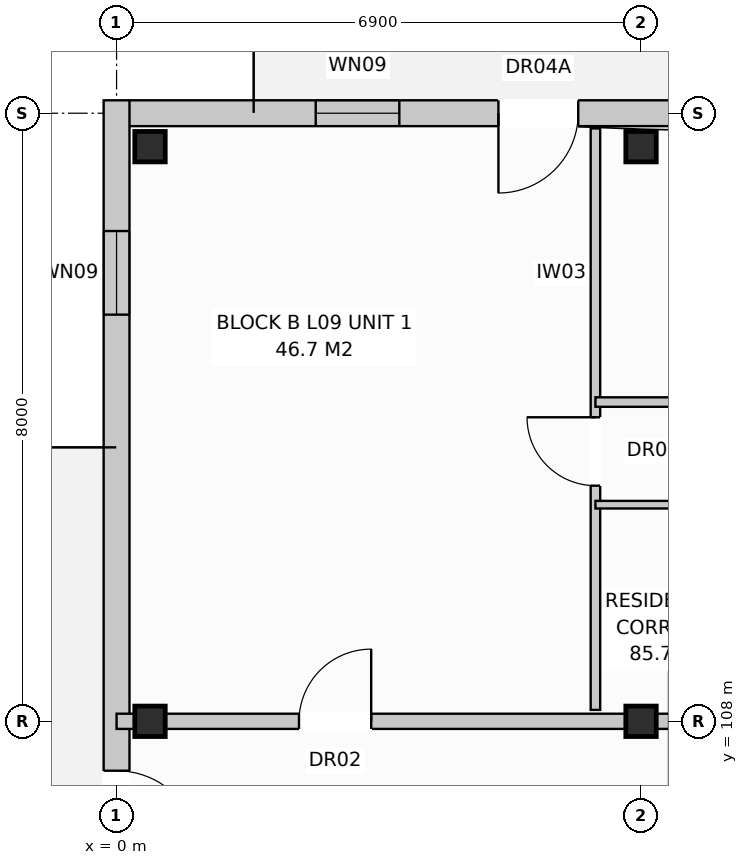
"""IFC4 building model, lengths in metres.
Left out: names, types, materials, properties, quantities, classifications, styles, units other than length and angle.
Written with IfcOpenShell. Run it as: python <this file> out.ifc"""

import sys

from ifc_helpers import new_model, si_unit, direction, frame, frame_2d, origin, origin_with_axes, origin_2d, place, context, subcontext, project, spatial, rectangle, extrude, element, fill, save


model = new_model("IFC4")
c1 = context("Model", 3, precision=1e-05, world=origin(), true_north=direction((0.0, 1.0)))
c2 = subcontext(c1, "Body", "Model", "MODEL_VIEW")
j1 = project(units=[si_unit("LENGTHUNIT", "METRE"), si_unit("PLANEANGLEUNIT", "RADIAN")], contexts=[c1])
p1 = place(None, origin())
s1 = spatial("IfcSite", under=j1, at=p1, CompositionType="ELEMENT")
p2 = place(p1, origin())
s2 = spatial("IfcBuilding", under=s1, at=p2, CompositionType="ELEMENT")
p3 = place(p2, frame((0.0, 0.0, 30.4)))
s3 = spatial("IfcBuildingStorey", under=s2, at=p3, CompositionType="ELEMENT", Elevation=30.4)
for number, where, z_axis, x_axis in (
    (1, (0.44, 108.0, 0.0), (0.0, 0.0, 1.0), (1.0, 0.0, 0.0)),
    (2, (0.44, 115.56, 0.0), (0.0, 0.0, 1.0), (1.0, 0.0, 0.0)),
    (3, (6.9, 108.0, 0.0), (0.0, 0.0, 1.0), (1.0, 0.0, 0.0)),
    (4, (6.9, 115.56, 0.0), (0.0, 0.0, 1.0), (1.0, 0.0, 0.0)),
):
    element("IfcColumn", number, at=place(p3, frame(where, z_axis=z_axis, x_axis=x_axis)), inside=s3, PredefinedType="COLUMN", context=c2, shape_type="SweptSolid", body=[
        extrude(rectangle(XDim=0.4, YDim=0.4, at=origin_2d()), origin(), (0.0, 0.0, 1.0), 3.2),
    ])
p4 = place(p3, frame((0.16, 116.0, 0.0), z_axis=(0.0, 0.0, 1.0), x_axis=(1.0, 0.0, 0.0)))
e5 = element("IfcWall", 5, at=p4, inside=s3, PredefinedType="STANDARD", context=c2, shape_type="SweptSolid", body=[
    extrude(rectangle(XDim=41.08, YDim=0.34, at=frame_2d((20.54, 0.0))), origin(), (0.0, 0.0, 1.0), 2.96),
])
p5 = place(p4, frame((4.864, 0.0, 0.0)))
e6 = element("IfcOpeningElement", 6, at=p5, cuts=e5, PredefinedType="OPENING", context=c2, shape_type="SweptSolid", body=[
    extrude(rectangle(XDim=1.05, YDim=2.12, at=frame_2d((0.525, 1.06))), frame((0.0, 0.182, 0.0), z_axis=(0.0, -1.0, 0.0), x_axis=(1.0, 0.0, 0.0)), (0.0, 0.0, 1.0), 0.364),
])
p6 = place(p4, frame((18.86, 0.0, 0.0)))
e7 = element("IfcOpeningElement", 7, at=p6, cuts=e5, PredefinedType="OPENING", context=c2, shape_type="SweptSolid", body=[
    extrude(rectangle(XDim=1.05, YDim=2.12, at=frame_2d((0.525, 1.06))), frame((0.0, 0.182, 0.0), z_axis=(0.0, -1.0, 0.0), x_axis=(1.0, 0.0, 0.0)), (0.0, 0.0, 1.0), 0.364),
])
p7 = place(p4, frame((30.364, 0.0, 0.0)))
e8 = element("IfcOpeningElement", 8, at=p7, cuts=e5, PredefinedType="OPENING", context=c2, shape_type="SweptSolid", body=[
    extrude(rectangle(XDim=1.05, YDim=2.12, at=frame_2d((0.525, 1.06))), frame((0.0, 0.182, 0.0), z_axis=(0.0, -1.0, 0.0), x_axis=(1.0, 0.0, 0.0)), (0.0, 0.0, 1.0), 0.364),
])
p8 = place(p4, frame((2.46, 0.0, 0.72)))
e9 = element("IfcOpeningElement", 9, at=p8, cuts=e5, PredefinedType="OPENING", context=c2, shape_type="SweptSolid", body=[
    extrude(rectangle(XDim=1.1, YDim=1.5, at=frame_2d((0.55, 0.75))), frame((0.0, 0.182, 0.0), z_axis=(0.0, -1.0, 0.0), x_axis=(1.0, 0.0, 0.0)), (0.0, 0.0, 1.0), 0.364),
])
p9 = place(p4, frame((7.735, 0.0, 0.8)))
e10 = element("IfcOpeningElement", 10, at=p9, cuts=e5, PredefinedType="OPENING", context=c2, shape_type="SweptSolid", body=[
    extrude(rectangle(XDim=1.95, YDim=1.65, at=frame_2d((0.975, 0.825))), frame((0.0, 0.182, 0.0), z_axis=(0.0, -1.0, 0.0), x_axis=(1.0, 0.0, 0.0)), (0.0, 0.0, 1.0), 0.364),
])
p10 = place(p4, frame((14.56, 0.0, 0.72)))
e11 = element("IfcOpeningElement", 11, at=p10, cuts=e5, PredefinedType="OPENING", context=c2, shape_type="SweptSolid", body=[
    extrude(rectangle(XDim=1.1, YDim=1.5, at=frame_2d((0.55, 0.75))), frame((0.0, 0.182, 0.0), z_axis=(0.0, -1.0, 0.0), x_axis=(1.0, 0.0, 0.0)), (0.0, 0.0, 1.0), 0.364),
])
p11 = place(p4, frame((16.81, 0.0, 0.8)))
e12 = element("IfcOpeningElement", 12, at=p11, cuts=e5, PredefinedType="OPENING", context=c2, shape_type="SweptSolid", body=[
    extrude(rectangle(XDim=1.8, YDim=1.7, at=frame_2d((0.9, 0.85))), frame((0.0, 0.182, 0.0), z_axis=(0.0, -1.0, 0.0), x_axis=(1.0, 0.0, 0.0)), (0.0, 0.0, 1.0), 0.364),
])
p12 = place(p4, frame((21.535, 0.0, 0.8)))
e13 = element("IfcOpeningElement", 13, at=p12, cuts=e5, PredefinedType="OPENING", context=c2, shape_type="SweptSolid", body=[
    extrude(rectangle(XDim=1.95, YDim=1.65, at=frame_2d((0.975, 0.825))), frame((0.0, 0.182, 0.0), z_axis=(0.0, -1.0, 0.0), x_axis=(1.0, 0.0, 0.0)), (0.0, 0.0, 1.0), 0.364),
])
p13 = place(p4, frame((25.36, 0.0, 0.72)))
e14 = element("IfcOpeningElement", 14, at=p13, cuts=e5, PredefinedType="OPENING", context=c2, shape_type="SweptSolid", body=[
    extrude(rectangle(XDim=1.1, YDim=1.5, at=frame_2d((0.55, 0.75))), frame((0.0, 0.182, 0.0), z_axis=(0.0, -1.0, 0.0), x_axis=(1.0, 0.0, 0.0)), (0.0, 0.0, 1.0), 0.364),
])
p14 = place(p4, frame((28.66, 0.0, 0.72)))
e15 = element("IfcOpeningElement", 15, at=p14, cuts=e5, PredefinedType="OPENING", context=c2, shape_type="SweptSolid", body=[
    extrude(rectangle(XDim=1.1, YDim=1.5, at=frame_2d((0.55, 0.75))), frame((0.0, 0.182, 0.0), z_axis=(0.0, -1.0, 0.0), x_axis=(1.0, 0.0, 0.0)), (0.0, 0.0, 1.0), 0.364),
])
p15 = place(p4, frame((31.935, 0.0, 0.8)))
e16 = element("IfcOpeningElement", 16, at=p15, cuts=e5, PredefinedType="OPENING", context=c2, shape_type="SweptSolid", body=[
    extrude(rectangle(XDim=1.95, YDim=1.65, at=frame_2d((0.975, 0.825))), frame((0.0, 0.182, 0.0), z_axis=(0.0, -1.0, 0.0), x_axis=(1.0, 0.0, 0.0)), (0.0, 0.0, 1.0), 0.364),
])
p16 = place(p4, frame((38.06, 0.0, 0.72)))
e17 = element("IfcOpeningElement", 17, at=p16, cuts=e5, PredefinedType="OPENING", context=c2, shape_type="SweptSolid", body=[
    extrude(rectangle(XDim=1.1, YDim=1.5, at=frame_2d((0.55, 0.75))), frame((0.0, 0.182, 0.0), z_axis=(0.0, -1.0, 0.0), x_axis=(1.0, 0.0, 0.0)), (0.0, 0.0, 1.0), 0.364),
])
p17 = place(p3, frame((0.0, 97.43, 0.0), z_axis=(0.0, 0.0, 1.0), x_axis=(0.0, 1.0, 0.0)))
e18 = element("IfcWall", 18, at=p17, inside=s3, PredefinedType="STANDARD", context=c2, shape_type="SweptSolid", body=[
    extrude(rectangle(XDim=18.74, YDim=0.34, at=frame_2d((9.37, 0.0))), origin(), (0.0, 0.0, 1.0), 2.96),
])
p18 = place(p17, frame((8.82, 0.0, 0.0)))
e19 = element("IfcOpeningElement", 19, at=p18, cuts=e18, PredefinedType="OPENING", context=c2, shape_type="SweptSolid", body=[
    extrude(rectangle(XDim=1.1, YDim=2.1, at=frame_2d((0.55, 1.05))), frame((0.0, 0.182, 0.0), z_axis=(0.0, -1.0, 0.0), x_axis=(1.0, 0.0, 0.0)), (0.0, 0.0, 1.0), 0.364),
])
p19 = place(p17, frame((1.72, 0.0, 0.72)))
e20 = element("IfcOpeningElement", 20, at=p19, cuts=e18, PredefinedType="OPENING", context=c2, shape_type="SweptSolid", body=[
    extrude(rectangle(XDim=1.1, YDim=1.5, at=frame_2d((0.55, 0.75))), frame((0.0, 0.182, 0.0), z_axis=(0.0, -1.0, 0.0), x_axis=(1.0, 0.0, 0.0)), (0.0, 0.0, 1.0), 0.364),
])
p20 = place(p17, frame((15.92, 0.0, 0.72)))
e21 = element("IfcOpeningElement", 21, at=p20, cuts=e18, PredefinedType="OPENING", context=c2, shape_type="SweptSolid", body=[
    extrude(rectangle(XDim=1.1, YDim=1.5, at=frame_2d((0.55, 0.75))), frame((0.0, 0.182, 0.0), z_axis=(0.0, -1.0, 0.0), x_axis=(1.0, 0.0, 0.0)), (0.0, 0.0, 1.0), 0.364),
])
p21 = place(p3, frame((0.0, 108.0, 0.0), z_axis=(0.0, 0.0, 1.0), x_axis=(1.0, 0.0, 0.0)))
e22 = element("IfcWall", 22, at=p21, inside=s3, PredefinedType="PARTITIONING", context=c2, shape_type="SweptSolid", body=[
    extrude(rectangle(XDim=20.7, YDim=0.2, at=frame_2d((10.35, 0.0))), origin(), (0.0, 0.0, 1.0), 2.4),
])
p22 = place(p21, frame((2.4, 0.0, 0.0)))
e23 = element("IfcOpeningElement", 23, at=p22, cuts=e22, PredefinedType="OPENING", context=c2, shape_type="SweptSolid", body=[
    extrude(rectangle(XDim=0.95, YDim=2.15, at=frame_2d((0.475, 1.075))), frame((0.0, 0.112, 0.0), z_axis=(0.0, -1.0, 0.0), x_axis=(1.0, 0.0, 0.0)), (0.0, 0.0, 1.0), 0.224),
])
p23 = place(p3, frame((6.3, 108.15, 0.0), z_axis=(0.0, 0.0, 1.0), x_axis=(0.0, 1.0, 0.0)))
e24 = element("IfcWall", 24, at=p23, inside=s3, PredefinedType="PARTITIONING", context=c2, shape_type="SweptSolid", body=[
    extrude(rectangle(XDim=7.65, YDim=0.125, at=frame_2d((3.825, 0.0))), origin(), (0.0, 0.0, 1.0), 2.96),
])
p24 = place(p23, frame((2.95, 0.0, 0.0)))
e25 = element("IfcOpeningElement", 25, at=p24, cuts=e24, PredefinedType="OPENING", context=c2, shape_type="SweptSolid", body=[
    extrude(rectangle(XDim=0.9, YDim=2.1, at=frame_2d((0.45, 1.05))), frame((0.0, 0.074, 0.0), z_axis=(0.0, -1.0, 0.0), x_axis=(1.0, 0.0, 0.0)), (0.0, 0.0, 1.0), 0.149),
])
p25 = place(p3, frame((6.3, 110.85, 0.0), z_axis=(0.0, 0.0, 1.0), x_axis=(1.0, 0.0, 0.0)))
e26 = element("IfcWall", 26, at=p25, inside=s3, PredefinedType="PARTITIONING", context=c2, shape_type="SweptSolid", body=[
    extrude(rectangle(XDim=14.3, YDim=0.1, at=frame_2d((7.15, 0.0))), origin(), (0.0, 0.0, 1.0), 2.96),
])
p26 = place(p25, frame((1.6, 0.0, 0.0)))
e27 = element("IfcOpeningElement", 27, at=p26, cuts=e26, PredefinedType="OPENING", context=c2, shape_type="SweptSolid", body=[
    extrude(rectangle(XDim=0.9, YDim=2.1, at=frame_2d((0.45, 1.05))), frame((0.0, 0.062, 0.0), z_axis=(0.0, -1.0, 0.0), x_axis=(1.0, 0.0, 0.0)), (0.0, 0.0, 1.0), 0.124),
])
p27 = place(p25, frame((5.1, 0.0, 0.0)))
e28 = element("IfcOpeningElement", 28, at=p27, cuts=e26, PredefinedType="OPENING", context=c2, shape_type="SweptSolid", body=[
    extrude(rectangle(XDim=0.85, YDim=2.05, at=frame_2d((0.425, 1.025))), frame((0.0, 0.062, 0.0), z_axis=(0.0, -1.0, 0.0), x_axis=(1.0, 0.0, 0.0)), (0.0, 0.0, 1.0), 0.124),
])
p28 = place(p25, frame((8.2, 0.0, 0.0)))
e29 = element("IfcOpeningElement", 29, at=p28, cuts=e26, PredefinedType="OPENING", context=c2, shape_type="SweptSolid", body=[
    extrude(rectangle(XDim=0.85, YDim=2.05, at=frame_2d((0.425, 1.025))), frame((0.0, 0.062, 0.0), z_axis=(0.0, -1.0, 0.0), x_axis=(1.0, 0.0, 0.0)), (0.0, 0.0, 1.0), 0.124),
])
p29 = place(p25, frame((11.6, 0.0, 0.0)))
e30 = element("IfcOpeningElement", 30, at=p29, cuts=e26, PredefinedType="OPENING", context=c2, shape_type="SweptSolid", body=[
    extrude(rectangle(XDim=0.85, YDim=2.05, at=frame_2d((0.425, 1.025))), frame((0.0, 0.062, 0.0), z_axis=(0.0, -1.0, 0.0), x_axis=(1.0, 0.0, 0.0)), (0.0, 0.0, 1.0), 0.124),
])
p30 = place(p3, frame((6.3, 112.2, 0.0), z_axis=(0.0, 0.0, 1.0), x_axis=(1.0, 0.0, 0.0)))
e31 = element("IfcWall", 31, at=p30, inside=s3, PredefinedType="PARTITIONING", context=c2, shape_type="SweptSolid", body=[
    extrude(rectangle(XDim=10.4, YDim=0.125, at=frame_2d((5.2, 0.0))), origin(), (0.0, 0.0, 1.0), 2.96),
])
p31 = place(p30, frame((2.0, 0.0, 0.0)))
e32 = element("IfcOpeningElement", 32, at=p31, cuts=e31, PredefinedType="OPENING", context=c2, shape_type="SweptSolid", body=[
    extrude(rectangle(XDim=0.9, YDim=2.1, at=frame_2d((0.45, 1.05))), frame((0.0, 0.074, 0.0), z_axis=(0.0, -1.0, 0.0), x_axis=(1.0, 0.0, 0.0)), (0.0, 0.0, 1.0), 0.149),
])
p32 = place(p30, frame((7.2, 0.0, 0.0)))
e33 = element("IfcOpeningElement", 33, at=p32, cuts=e31, PredefinedType="OPENING", context=c2, shape_type="SweptSolid", body=[
    extrude(rectangle(XDim=0.9, YDim=2.1, at=frame_2d((0.45, 1.05))), frame((0.0, 0.074, 0.0), z_axis=(0.0, -1.0, 0.0), x_axis=(1.0, 0.0, 0.0)), (0.0, 0.0, 1.0), 0.149),
])
p33 = place(p5, frame((1.05, 0.0, 0.0), z_axis=(0.0, 0.0, 1.0), x_axis=(-1.0, 0.0, 0.0)))
e34 = element("IfcDoor", 34, at=p33, inside=s3, OperationType="SINGLE_SWING_LEFT", PredefinedType="DOOR", context=c2, shape_type="SweptSolid", body=[
    extrude(rectangle(XDim=1.05, YDim=2.12, at=frame_2d((0.525, 1.06))), frame((0.0, 0.025, 0.0), z_axis=(0.0, -1.0, 0.0), x_axis=(1.0, 0.0, 0.0)), (0.0, 0.0, 1.0), 0.05),
])
fill(e6, e34)
p34 = place(p8, origin_with_axes())
e35 = element("IfcWindow", 35, at=p34, inside=s3, PartitioningType="SINGLE_PANEL", PredefinedType="WINDOW", context=c2, shape_type="SweptSolid", body=[
    extrude(rectangle(XDim=1.1, YDim=1.5, at=frame_2d((0.55, 0.75))), frame((0.0, 0.03, 0.0), z_axis=(0.0, -1.0, 0.0), x_axis=(1.0, 0.0, 0.0)), (0.0, 0.0, 1.0), 0.06),
])
fill(e9, e35)
p35 = place(p18, frame((1.1, 0.0, 0.0), z_axis=(0.0, 0.0, 1.0), x_axis=(-1.0, 0.0, 0.0)))
e36 = element("IfcDoor", 36, at=p35, inside=s3, OperationType="SINGLE_SWING_LEFT", PredefinedType="DOOR", context=c2, shape_type="SweptSolid", body=[
    extrude(rectangle(XDim=1.1, YDim=2.1, at=frame_2d((0.55, 1.05))), frame((0.0, 0.025, 0.0), z_axis=(0.0, -1.0, 0.0), x_axis=(1.0, 0.0, 0.0)), (0.0, 0.0, 1.0), 0.05),
])
fill(e19, e36)
p36 = place(p20, origin_with_axes())
e37 = element("IfcWindow", 37, at=p36, inside=s3, PartitioningType="SINGLE_PANEL", PredefinedType="WINDOW", context=c2, shape_type="SweptSolid", body=[
    extrude(rectangle(XDim=1.1, YDim=1.5, at=frame_2d((0.55, 0.75))), frame((0.0, 0.03, 0.0), z_axis=(0.0, -1.0, 0.0), x_axis=(1.0, 0.0, 0.0)), (0.0, 0.0, 1.0), 0.06),
])
fill(e21, e37)
p37 = place(p22, origin_with_axes())
e38 = element("IfcDoor", 38, at=p37, inside=s3, OperationType="SINGLE_SWING_RIGHT", PredefinedType="DOOR", context=c2, shape_type="SweptSolid", body=[
    extrude(rectangle(XDim=0.95, YDim=2.15, at=frame_2d((0.475, 1.075))), frame((0.0, 0.025, 0.0), z_axis=(0.0, -1.0, 0.0), x_axis=(1.0, 0.0, 0.0)), (0.0, 0.0, 1.0), 0.05),
])
fill(e23, e38)
p38 = place(p24, origin_with_axes())
e39 = element("IfcDoor", 39, at=p38, inside=s3, OperationType="SINGLE_SWING_RIGHT", PredefinedType="DOOR", context=c2, shape_type="SweptSolid", body=[
    extrude(rectangle(XDim=0.9, YDim=2.1, at=frame_2d((0.45, 1.05))), frame((0.0, 0.025, 0.0), z_axis=(0.0, -1.0, 0.0), x_axis=(1.0, 0.0, 0.0)), (0.0, 0.0, 1.0), 0.05),
])
fill(e25, e39)
save(model, sys.argv[1])
